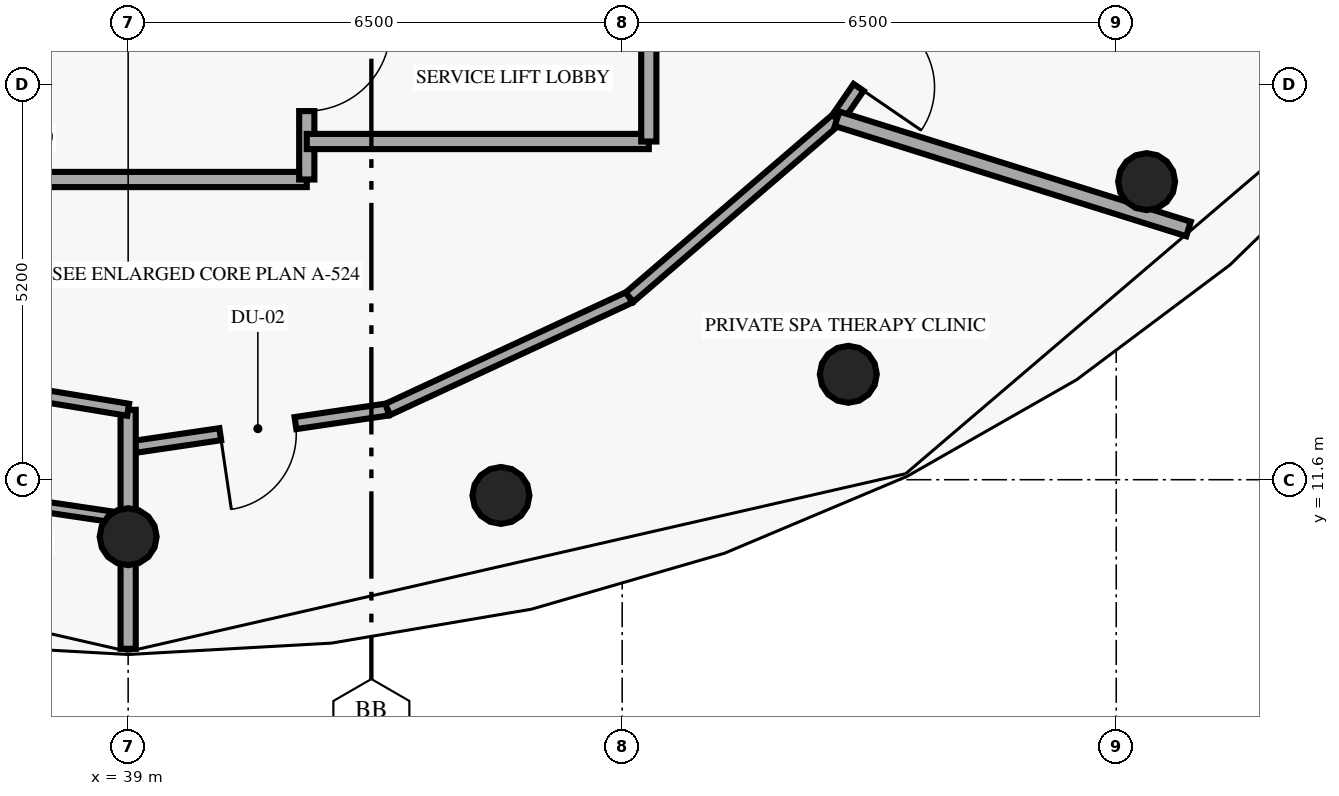
"""IFC4 building model, lengths in metres.
Left out: names, types, materials, properties, quantities, classifications, styles, units other than length and angle.
Written with IfcOpenShell. Run it as: python <this file> out.ifc"""

import sys

from ifc_helpers import new_model, si_unit, direction, frame, frame_2d, origin, origin_2d, place, context, subcontext, project, spatial, rectangle, circle, extrude, element, fill, save


model = new_model("IFC4")
c1 = context("Model", 3, precision=1e-05, world=origin(), true_north=direction((0.0, 1.0)))
c2 = subcontext(c1, "Body", "Model", "MODEL_VIEW")
j1 = project(units=[si_unit("LENGTHUNIT", "METRE"), si_unit("PLANEANGLEUNIT", "RADIAN")], contexts=[c1])
p1 = place(None, origin())
s1 = spatial("IfcSite", under=j1, at=p1, CompositionType="ELEMENT")
p2 = place(p1, origin())
s2 = spatial("IfcBuilding", under=s1, at=p2, CompositionType="ELEMENT")
p3 = place(p2, frame((0.0, 0.0, 297.4)))
s3 = spatial("IfcBuildingStorey", under=s2, at=p3, CompositionType="ELEMENT", Elevation=297.4)
for number, where, z_axis, x_axis in (
    (1, (39.0, 10.85, 0.0), (0.0, 0.0, 1.0), (1.0, 0.0, 0.0)),
    (2, (43.905, 11.393, 0.0), (0.0, 0.0, 1.0), (1.0, 0.0, 0.0)),
    (3, (48.475, 12.987, 0.0), (0.0, 0.0, 1.0), (1.0, 0.0, 0.0)),
    (4, (52.4, 15.522, 0.0), (0.0, 0.0, 1.0), (1.0, 0.0, 0.0)),
):
    element("IfcColumn", number, at=place(p3, frame(where, z_axis=z_axis, x_axis=x_axis)), inside=s3, PredefinedType="COLUMN", context=c2, shape_type="SweptSolid", body=[
        extrude(circle(Radius=0.375, at=origin_2d()), origin(), (0.0, 0.0, 1.0), 3.45),
    ])
p4 = place(p3, frame((33.8, 15.55, 0.0), z_axis=(0.0, 0.0, 1.0), x_axis=(1.0, 0.0, 0.0)))
e5 = element("IfcWall", 5, at=p4, inside=s3, PredefinedType="SOLIDWALL", context=c2, shape_type="SweptSolid", body=[
    extrude(rectangle(XDim=7.55, YDim=0.2, at=frame_2d((3.775, 0.0))), origin(), (0.0, 0.0, 1.0), 3.45),
])
p5 = place(p3, frame((41.35, 15.55, 0.0), z_axis=(0.0, 0.0, 1.0), x_axis=(0.0, 1.0, 0.0)))
e6 = element("IfcWall", 6, at=p5, inside=s3, PredefinedType="SOLIDWALL", context=c2, shape_type="SweptSolid", body=[
    extrude(rectangle(XDim=2.8, YDim=0.2, at=frame_2d((1.4, 0.0))), origin(), (0.0, 0.0, 1.0), 3.45),
])
p6 = place(p5, frame((0.9, 0.0, 0.0)))
e7 = element("IfcOpeningElement", 7, at=p6, cuts=e6, PredefinedType="OPENING", context=c2, shape_type="SweptSolid", body=[
    extrude(rectangle(XDim=1.1, YDim=2.15, at=frame_2d((0.55, 1.075))), frame((0.0, 0.11, 0.0), z_axis=(0.0, -1.0, 0.0), x_axis=(1.0, 0.0, 0.0)), (0.0, 0.0, 1.0), 0.22),
])
p7 = place(p3, frame((41.35, 16.05, 0.0), z_axis=(0.0, 0.0, 1.0), x_axis=(1.0, 0.0, 0.0)))
e8 = element("IfcWall", 8, at=p7, inside=s3, PredefinedType="SOLIDWALL", context=c2, shape_type="SweptSolid", body=[
    extrude(rectangle(XDim=4.5, YDim=0.2, at=frame_2d((2.25, 0.0))), origin(), (0.0, 0.0, 1.0), 3.45),
])
p8 = place(p3, frame((45.85, 16.05, 0.0), z_axis=(0.0, 0.0, 1.0), x_axis=(0.0, 1.0, 0.0)))
e9 = element("IfcWall", 9, at=p8, inside=s3, PredefinedType="SOLIDWALL", context=c2, shape_type="SweptSolid", body=[
    extrude(rectangle(XDim=2.3, YDim=0.2, at=frame_2d((1.15, 0.0))), origin(), (0.0, 0.0, 1.0), 3.45),
])
p9 = place(p3, frame((42.414, 12.524, 0.0), z_axis=(0.0, 0.0, 1.0), x_axis=(-0.989282323844, -0.146015354435, 0.0)))
e10 = element("IfcWall", 10, at=p9, inside=s3, PredefinedType="PARTITIONING", context=c2, shape_type="SweptSolid", body=[
    extrude(rectangle(XDim=3.451, YDim=0.16, at=frame_2d((1.726, 0.0))), origin(), (0.0, 0.0, 1.0), 3.45),
])
p10 = place(p9, frame((1.226, 0.0, 0.0)))
e11 = element("IfcOpeningElement", 11, at=p10, cuts=e10, PredefinedType="OPENING", context=c2, shape_type="SweptSolid", body=[
    extrude(rectangle(XDim=1.0, YDim=2.15, at=frame_2d((0.5, 1.075))), frame((0.0, 0.09, 0.0), z_axis=(0.0, -1.0, 0.0), x_axis=(1.0, 0.0, 0.0)), (0.0, 0.0, 1.0), 0.18),
])
p11 = place(p3, frame((42.414, 12.524, 0.0), z_axis=(0.0, 0.0, 1.0), x_axis=(0.907093473746, 0.420929245703, 0.0)))
e12 = element("IfcWall", 12, at=p11, inside=s3, PredefinedType="PARTITIONING", context=c2, shape_type="SweptSolid", body=[
    extrude(rectangle(XDim=3.507, YDim=0.16, at=frame_2d((1.753, 0.0))), origin(), (0.0, 0.0, 1.0), 3.45),
])
p12 = place(p3, frame((45.595, 14.0, 0.0), z_axis=(0.0, 0.0, 1.0), x_axis=(0.758232091793, 0.651984735231, 0.0)))
e13 = element("IfcWall", 13, at=p12, inside=s3, PredefinedType="PARTITIONING", context=c2, shape_type="SweptSolid", body=[
    extrude(rectangle(XDim=3.603, YDim=0.16, at=frame_2d((1.802, 0.0))), origin(), (0.0, 0.0, 1.0), 3.45),
])
p13 = place(p3, frame((50.423, 19.41, 0.0), z_axis=(0.0, 0.0, 1.0), x_axis=(-0.565044823329, -0.825060208487, 0.0)))
e14 = element("IfcWall", 14, at=p13, inside=s3, PredefinedType="PARTITIONING", context=c2, shape_type="SweptSolid", body=[
    extrude(rectangle(XDim=3.71, YDim=0.16, at=frame_2d((1.855, 0.0))), origin(), (0.0, 0.0, 1.0), 3.45),
])
p14 = place(p13, frame((2.209, 0.0, 0.0)))
e15 = element("IfcOpeningElement", 15, at=p14, cuts=e14, PredefinedType="OPENING", context=c2, shape_type="SweptSolid", body=[
    extrude(rectangle(XDim=1.0, YDim=2.15, at=frame_2d((0.5, 1.075))), frame((0.0, 0.09, 0.0), z_axis=(0.0, -1.0, 0.0), x_axis=(1.0, 0.0, 0.0)), (0.0, 0.0, 1.0), 0.18),
])
p15 = place(p3, frame((39.0, 12.52, 0.0), z_axis=(0.0, 0.0, 1.0), x_axis=(0.0, -1.0, 0.0)))
e16 = element("IfcWall", 16, at=p15, inside=s3, PredefinedType="PARTITIONING", context=c2, shape_type="SweptSolid", body=[
    extrude(rectangle(XDim=1.69, YDim=0.2, at=frame_2d((0.845, 0.0))), origin(), (0.0, 0.0, 1.0), 2.835),
])
p16 = place(p3, frame((39.0, 10.83, 0.0), z_axis=(0.0, 0.0, 1.0), x_axis=(0.0, -1.0, 0.0)))
e17 = element("IfcWall", 17, at=p16, inside=s3, PredefinedType="PARTITIONING", context=c2, shape_type="SweptSolid", body=[
    extrude(rectangle(XDim=1.455, YDim=0.2, at=frame_2d((0.728, 0.0))), origin(), (0.0, 0.0, 1.0), 3.45),
])
p17 = place(p3, frame((48.327, 16.349, 0.0), z_axis=(0.0, 0.0, 1.0), x_axis=(0.954174696895, -0.299250142532, 0.0)))
e18 = element("IfcWall", 18, at=p17, inside=s3, PredefinedType="PARTITIONING", context=c2, shape_type="SweptSolid", body=[
    extrude(rectangle(XDim=4.846, YDim=0.2, at=frame_2d((2.423, 0.0))), origin(), (0.0, 0.0, 1.0), 3.45),
])
p18 = place(p3, frame((36.049, 13.007, 0.0), z_axis=(0.0, 0.0, 1.0), x_axis=(0.986650832406, -0.162850038111, 0.0)))
e19 = element("IfcWall", 19, at=p18, inside=s3, PredefinedType="PARTITIONING", context=c2, shape_type="SweptSolid", body=[
    extrude(rectangle(XDim=2.991, YDim=0.16, at=frame_2d((1.496, 0.0))), origin(), (0.0, 0.0, 1.0), 3.45),
])
p19 = place(p3, frame((39.0, 11.08, 0.0), z_axis=(0.0, 0.0, 1.0), x_axis=(-0.989167166266, 0.146793450744, 0.0)))
e20 = element("IfcWall", 20, at=p19, inside=s3, PredefinedType="PARTITIONING", context=c2, shape_type="SweptSolid", body=[
    extrude(rectangle(XDim=3.651, YDim=0.14, at=frame_2d((1.825, 0.0))), origin(), (0.0, 0.0, 1.0), 3.45),
])
p20 = place(p19, frame((1.4, 0.0, 0.0)))
e21 = element("IfcOpeningElement", 21, at=p20, cuts=e20, PredefinedType="OPENING", context=c2, shape_type="SweptSolid", body=[
    extrude(rectangle(XDim=0.85, YDim=2.1, at=frame_2d((0.425, 1.05))), frame((0.0, 0.08, 0.0), z_axis=(0.0, -1.0, 0.0), x_axis=(1.0, 0.0, 0.0)), (0.0, 0.0, 1.0), 0.16),
])
p21 = place(p6, origin())
e22 = element("IfcDoor", 22, at=p21, inside=s3, OperationType="SINGLE_SWING_RIGHT", PredefinedType="DOOR", context=c2, shape_type="SweptSolid", body=[
    extrude(rectangle(XDim=1.1, YDim=2.15, at=frame_2d((0.55, 1.075))), frame((0.0, 0.025, 0.0), z_axis=(0.0, -1.0, 0.0), x_axis=(1.0, 0.0, 0.0)), (0.0, 0.0, 1.0), 0.05),
])
fill(e7, e22)
p22 = place(p10, origin())
e23 = element("IfcDoor", 23, at=p22, inside=s3, OperationType="SINGLE_SWING_RIGHT", PredefinedType="DOOR", context=c2, shape_type="SweptSolid", body=[
    extrude(rectangle(XDim=1.0, YDim=2.15, at=frame_2d((0.5, 1.075))), frame((0.0, 0.025, 0.0), z_axis=(0.0, -1.0, 0.0), x_axis=(1.0, 0.0, 0.0)), (0.0, 0.0, 1.0), 0.05),
])
fill(e11, e23)
p23 = place(p14, origin())
e24 = element("IfcDoor", 24, at=p23, inside=s3, OperationType="SINGLE_SWING_RIGHT", PredefinedType="DOOR", context=c2, shape_type="SweptSolid", body=[
    extrude(rectangle(XDim=1.0, YDim=2.15, at=frame_2d((0.5, 1.075))), frame((0.0, 0.025, 0.0), z_axis=(0.0, -1.0, 0.0), x_axis=(1.0, 0.0, 0.0)), (0.0, 0.0, 1.0), 0.05),
])
fill(e15, e24)
save(model, sys.argv[1])
